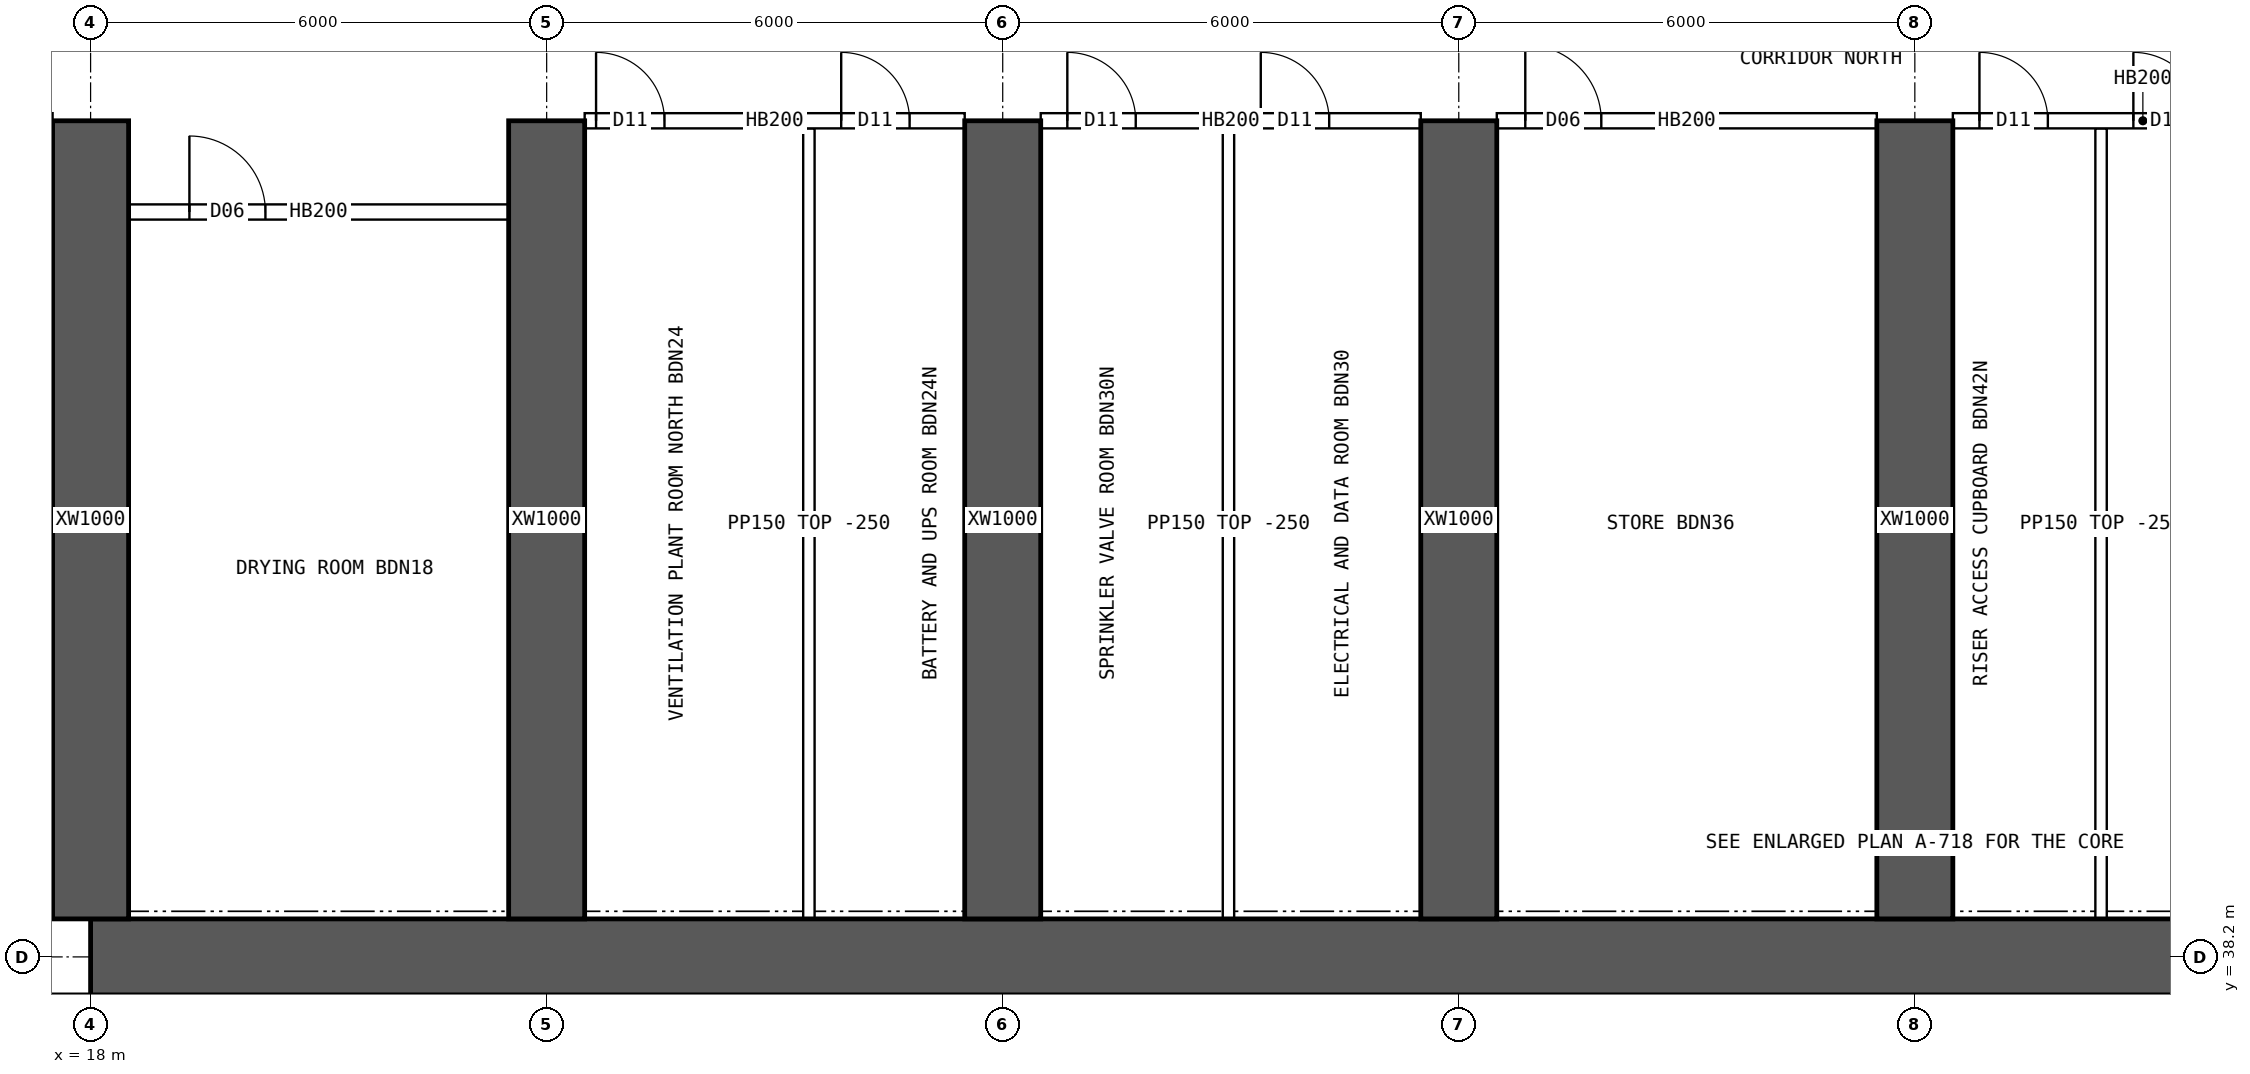
"""IFC4 building model, lengths in metres.
Left out: names, types, materials, properties, quantities, classifications, styles, units other than length and angle.
Written with IfcOpenShell. Run it as: python <this file> out.ifc"""

import sys

from ifc_helpers import new_model, si_unit, direction, frame, frame_2d, origin, place, context, subcontext, project, spatial, rectangle, extrude, element, fill, save


model = new_model("IFC4")
c1 = context("Model", 3, precision=1e-05, world=origin(), true_north=direction((0.0, 1.0)))
c2 = subcontext(c1, "Body", "Model", "MODEL_VIEW")
j1 = project(units=[si_unit("LENGTHUNIT", "METRE"), si_unit("PLANEANGLEUNIT", "RADIAN")], contexts=[c1])
p1 = place(None, origin())
s1 = spatial("IfcSite", under=j1, at=p1, CompositionType="ELEMENT")
p2 = place(p1, origin())
s2 = spatial("IfcBuilding", under=s1, at=p2, CompositionType="ELEMENT")
p3 = place(p2, frame((0.0, 0.0, 61.45)))
s3 = spatial("IfcBuildingStorey", under=s2, at=p3, CompositionType="ELEMENT", Elevation=61.45)
p4 = place(p3, frame((18.0, 38.2, 0.0), z_axis=(0.0, 0.0, 1.0), x_axis=(1.0, 0.0, 0.0)))
e1 = element("IfcWall", 1, at=p4, inside=s3, PredefinedType="SHEAR", context=c2, shape_type="SweptSolid", body=[
    extrude(rectangle(XDim=48.0, YDim=1.0, at=frame_2d((24.0, 0.0))), origin(), (0.0, 0.0, 1.0), 3.75),
])
for number, where, z_axis, x_axis in (
    (2, (21.6, 34.75, 0.0), (0.0, 0.0, 1.0), (0.0, 1.0, 0.0)),
    (3, (26.0, 34.75, 0.0), (0.0, 0.0, 1.0), (0.0, 1.0, 0.0)),
):
    element("IfcWall", number, at=place(p3, frame(where, z_axis=z_axis, x_axis=x_axis)), inside=s3, PredefinedType="SHEAR", context=c2, shape_type="SweptSolid", body=[
        extrude(rectangle(XDim=2.95, YDim=0.3, at=frame_2d((1.475, 0.0))), origin(), (0.0, 0.0, 1.0), 3.75),
    ])
for number, where, z_axis, x_axis in (
    (4, (18.0, 38.7, 0.0), (0.0, 0.0, 1.0), (0.0, 1.0, 0.0)),
    (5, (24.0, 38.7, 0.0), (0.0, 0.0, 1.0), (0.0, 1.0, 0.0)),
    (6, (30.0, 38.7, 0.0), (0.0, 0.0, 1.0), (0.0, 1.0, 0.0)),
    (7, (36.0, 38.7, 0.0), (0.0, 0.0, 1.0), (0.0, 1.0, 0.0)),
    (8, (42.0, 38.7, 0.0), (0.0, 0.0, 1.0), (0.0, 1.0, 0.0)),
):
    element("IfcWall", number, at=place(p3, frame(where, z_axis=z_axis, x_axis=x_axis)), inside=s3, PredefinedType="SHEAR", context=c2, shape_type="SweptSolid", body=[
        extrude(rectangle(XDim=10.5, YDim=1.0, at=frame_2d((5.25, 0.0))), origin(), (0.0, 0.0, 1.0), 3.75),
    ])
for number, where, z_axis, x_axis in (
    (9, (29.651, 34.75, 0.0), (0.0, 0.0, 1.0), (0.0, 1.0, 0.0)),
    (10, (33.946, 34.75, 0.0), (0.0, 0.0, 1.0), (0.0, 1.0, 0.0)),
    (11, (36.946, 34.75, 0.0), (0.0, 0.0, 1.0), (0.0, 1.0, 0.0)),
    (12, (41.463, 34.75, 0.0), (0.0, 0.0, 1.0), (0.0, 1.0, 0.0)),
):
    element("IfcWall", number, at=place(p3, frame(where, z_axis=z_axis, x_axis=x_axis)), inside=s3, PredefinedType="SOLIDWALL", context=c2, shape_type="SweptSolid", body=[
        extrude(rectangle(XDim=2.95, YDim=0.15, at=frame_2d((1.475, 0.0))), origin(), (0.0, 0.0, 1.0), 3.5),
    ])
p5 = place(p3, frame((24.5, 49.2, 0.0), z_axis=(0.0, 0.0, 1.0), x_axis=(1.0, 0.0, 0.0)))
e13 = element("IfcWall", 13, at=p5, inside=s3, PredefinedType="SOLIDWALL", context=c2, shape_type="SweptSolid", body=[
    extrude(rectangle(XDim=5.0, YDim=0.2, at=frame_2d((2.5, 0.0))), origin(), (0.0, 0.0, 1.0), 3.5),
])
p6 = place(p5, frame((0.15, 0.0, 0.0)))
e14 = element("IfcOpeningElement", 14, at=p6, cuts=e13, PredefinedType="OPENING", context=c2, shape_type="SweptSolid", body=[
    extrude(rectangle(XDim=0.9, YDim=2.1, at=frame_2d((0.45, 1.05))), frame((0.0, 0.11, 0.0), z_axis=(0.0, -1.0, 0.0), x_axis=(1.0, 0.0, 0.0)), (0.0, 0.0, 1.0), 0.22),
])
p7 = place(p5, frame((3.375, 0.0, 0.0)))
e15 = element("IfcOpeningElement", 15, at=p7, cuts=e13, PredefinedType="OPENING", context=c2, shape_type="SweptSolid", body=[
    extrude(rectangle(XDim=0.9, YDim=2.1, at=frame_2d((0.45, 1.05))), frame((0.0, 0.11, 0.0), z_axis=(0.0, -1.0, 0.0), x_axis=(1.0, 0.0, 0.0)), (0.0, 0.0, 1.0), 0.22),
])
p8 = place(p3, frame((30.5, 49.2, 0.0), z_axis=(0.0, 0.0, 1.0), x_axis=(1.0, 0.0, 0.0)))
e16 = element("IfcWall", 16, at=p8, inside=s3, PredefinedType="SOLIDWALL", context=c2, shape_type="SweptSolid", body=[
    extrude(rectangle(XDim=5.0, YDim=0.2, at=frame_2d((2.5, 0.0))), origin(), (0.0, 0.0, 1.0), 3.5),
])
p9 = place(p8, frame((0.35, 0.0, 0.0)))
e17 = element("IfcOpeningElement", 17, at=p9, cuts=e16, PredefinedType="OPENING", context=c2, shape_type="SweptSolid", body=[
    extrude(rectangle(XDim=0.9, YDim=2.1, at=frame_2d((0.45, 1.05))), frame((0.0, 0.11, 0.0), z_axis=(0.0, -1.0, 0.0), x_axis=(1.0, 0.0, 0.0)), (0.0, 0.0, 1.0), 0.22),
])
p10 = place(p8, frame((2.895, 0.0, 0.0)))
e18 = element("IfcOpeningElement", 18, at=p10, cuts=e16, PredefinedType="OPENING", context=c2, shape_type="SweptSolid", body=[
    extrude(rectangle(XDim=0.9, YDim=2.1, at=frame_2d((0.45, 1.05))), frame((0.0, 0.11, 0.0), z_axis=(0.0, -1.0, 0.0), x_axis=(1.0, 0.0, 0.0)), (0.0, 0.0, 1.0), 0.22),
])
p11 = place(p3, frame((36.5, 49.2, 0.0), z_axis=(0.0, 0.0, 1.0), x_axis=(1.0, 0.0, 0.0)))
e19 = element("IfcWall", 19, at=p11, inside=s3, PredefinedType="SOLIDWALL", context=c2, shape_type="SweptSolid", body=[
    extrude(rectangle(XDim=5.0, YDim=0.2, at=frame_2d((2.5, 0.0))), origin(), (0.0, 0.0, 1.0), 3.5),
])
p12 = place(p11, frame((0.375, 0.0, 0.0)))
e20 = element("IfcOpeningElement", 20, at=p12, cuts=e19, PredefinedType="OPENING", context=c2, shape_type="SweptSolid", body=[
    extrude(rectangle(XDim=1.0, YDim=2.1, at=frame_2d((0.5, 1.05))), frame((0.0, 0.11, 0.0), z_axis=(0.0, -1.0, 0.0), x_axis=(1.0, 0.0, 0.0)), (0.0, 0.0, 1.0), 0.22),
])
p13 = place(p3, frame((42.5, 49.2, 0.0), z_axis=(0.0, 0.0, 1.0), x_axis=(1.0, 0.0, 0.0)))
e21 = element("IfcWall", 21, at=p13, inside=s3, PredefinedType="SOLIDWALL", context=c2, shape_type="SweptSolid", body=[
    extrude(rectangle(XDim=5.0, YDim=0.2, at=frame_2d((2.5, 0.0))), origin(), (0.0, 0.0, 1.0), 3.5),
])
p14 = place(p13, frame((0.35, 0.0, 0.0)))
e22 = element("IfcOpeningElement", 22, at=p14, cuts=e21, PredefinedType="OPENING", context=c2, shape_type="SweptSolid", body=[
    extrude(rectangle(XDim=0.9, YDim=2.1, at=frame_2d((0.45, 1.05))), frame((0.0, 0.11, 0.0), z_axis=(0.0, -1.0, 0.0), x_axis=(1.0, 0.0, 0.0)), (0.0, 0.0, 1.0), 0.22),
])
p15 = place(p13, frame((2.375, 0.0, 0.0)))
e23 = element("IfcOpeningElement", 23, at=p15, cuts=e21, PredefinedType="OPENING", context=c2, shape_type="SweptSolid", body=[
    extrude(rectangle(XDim=0.9, YDim=2.1, at=frame_2d((0.45, 1.05))), frame((0.0, 0.11, 0.0), z_axis=(0.0, -1.0, 0.0), x_axis=(1.0, 0.0, 0.0)), (0.0, 0.0, 1.0), 0.22),
])
p16 = place(p3, frame((18.5, 48.0, 0.0), z_axis=(0.0, 0.0, 1.0), x_axis=(1.0, 0.0, 0.0)))
e24 = element("IfcWall", 24, at=p16, inside=s3, PredefinedType="SOLIDWALL", context=c2, shape_type="SweptSolid", body=[
    extrude(rectangle(XDim=5.0, YDim=0.2, at=frame_2d((2.5, 0.0))), origin(), (0.0, 0.0, 1.0), 3.5),
])
p17 = place(p16, frame((0.8, 0.0, 0.0)))
e25 = element("IfcOpeningElement", 25, at=p17, cuts=e24, PredefinedType="OPENING", context=c2, shape_type="SweptSolid", body=[
    extrude(rectangle(XDim=1.0, YDim=2.1, at=frame_2d((0.5, 1.05))), frame((0.0, 0.11, 0.0), z_axis=(0.0, -1.0, 0.0), x_axis=(1.0, 0.0, 0.0)), (0.0, 0.0, 1.0), 0.22),
])
for number, where, z_axis, x_axis in (
    (26, (27.45, 38.7, 0.0), (0.0, 0.0, 1.0), (0.0, 1.0, 0.0)),
    (27, (32.97, 38.7, 0.0), (0.0, 0.0, 1.0), (0.0, 1.0, 0.0)),
    (28, (44.45, 38.7, 0.0), (0.0, 0.0, 1.0), (0.0, 1.0, 0.0)),
):
    element("IfcWall", number, at=place(p3, frame(where, z_axis=z_axis, x_axis=x_axis)), inside=s3, PredefinedType="PARTITIONING", context=c2, shape_type="SweptSolid", body=[
        extrude(rectangle(XDim=10.4, YDim=0.15, at=frame_2d((5.2, 0.0))), origin(), (0.0, 0.0, 1.0), 3.5),
    ])
p18 = place(p17, origin())
e29 = element("IfcDoor", 29, at=p18, inside=s3, OperationType="SINGLE_SWING_LEFT", PredefinedType="DOOR", context=c2, shape_type="SweptSolid", body=[
    extrude(rectangle(XDim=1.0, YDim=2.1, at=frame_2d((0.5, 1.05))), frame((0.0, 0.025, 0.0), z_axis=(0.0, -1.0, 0.0), x_axis=(1.0, 0.0, 0.0)), (0.0, 0.0, 1.0), 0.05),
])
fill(e25, e29)
p19 = place(p6, origin())
e30 = element("IfcDoor", 30, at=p19, inside=s3, OperationType="SINGLE_SWING_LEFT", PredefinedType="DOOR", context=c2, shape_type="SweptSolid", body=[
    extrude(rectangle(XDim=0.9, YDim=2.1, at=frame_2d((0.45, 1.05))), frame((0.0, 0.025, 0.0), z_axis=(0.0, -1.0, 0.0), x_axis=(1.0, 0.0, 0.0)), (0.0, 0.0, 1.0), 0.05),
])
fill(e14, e30)
p20 = place(p7, origin())
e31 = element("IfcDoor", 31, at=p20, inside=s3, OperationType="SINGLE_SWING_LEFT", PredefinedType="DOOR", context=c2, shape_type="SweptSolid", body=[
    extrude(rectangle(XDim=0.9, YDim=2.1, at=frame_2d((0.45, 1.05))), frame((0.0, 0.025, 0.0), z_axis=(0.0, -1.0, 0.0), x_axis=(1.0, 0.0, 0.0)), (0.0, 0.0, 1.0), 0.05),
])
fill(e15, e31)
p21 = place(p9, origin())
e32 = element("IfcDoor", 32, at=p21, inside=s3, OperationType="SINGLE_SWING_LEFT", PredefinedType="DOOR", context=c2, shape_type="SweptSolid", body=[
    extrude(rectangle(XDim=0.9, YDim=2.1, at=frame_2d((0.45, 1.05))), frame((0.0, 0.025, 0.0), z_axis=(0.0, -1.0, 0.0), x_axis=(1.0, 0.0, 0.0)), (0.0, 0.0, 1.0), 0.05),
])
fill(e17, e32)
p22 = place(p10, origin())
e33 = element("IfcDoor", 33, at=p22, inside=s3, OperationType="SINGLE_SWING_LEFT", PredefinedType="DOOR", context=c2, shape_type="SweptSolid", body=[
    extrude(rectangle(XDim=0.9, YDim=2.1, at=frame_2d((0.45, 1.05))), frame((0.0, 0.025, 0.0), z_axis=(0.0, -1.0, 0.0), x_axis=(1.0, 0.0, 0.0)), (0.0, 0.0, 1.0), 0.05),
])
fill(e18, e33)
p23 = place(p12, origin())
e34 = element("IfcDoor", 34, at=p23, inside=s3, OperationType="SINGLE_SWING_LEFT", PredefinedType="DOOR", context=c2, shape_type="SweptSolid", body=[
    extrude(rectangle(XDim=1.0, YDim=2.1, at=frame_2d((0.5, 1.05))), frame((0.0, 0.025, 0.0), z_axis=(0.0, -1.0, 0.0), x_axis=(1.0, 0.0, 0.0)), (0.0, 0.0, 1.0), 0.05),
])
fill(e20, e34)
p24 = place(p14, origin())
e35 = element("IfcDoor", 35, at=p24, inside=s3, OperationType="SINGLE_SWING_LEFT", PredefinedType="DOOR", context=c2, shape_type="SweptSolid", body=[
    extrude(rectangle(XDim=0.9, YDim=2.1, at=frame_2d((0.45, 1.05))), frame((0.0, 0.025, 0.0), z_axis=(0.0, -1.0, 0.0), x_axis=(1.0, 0.0, 0.0)), (0.0, 0.0, 1.0), 0.05),
])
fill(e22, e35)
p25 = place(p15, origin())
e36 = element("IfcDoor", 36, at=p25, inside=s3, OperationType="SINGLE_SWING_LEFT", PredefinedType="DOOR", context=c2, shape_type="SweptSolid", body=[
    extrude(rectangle(XDim=0.9, YDim=2.1, at=frame_2d((0.45, 1.05))), frame((0.0, 0.025, 0.0), z_axis=(0.0, -1.0, 0.0), x_axis=(1.0, 0.0, 0.0)), (0.0, 0.0, 1.0), 0.05),
])
fill(e23, e36)
save(model, sys.argv[1])
